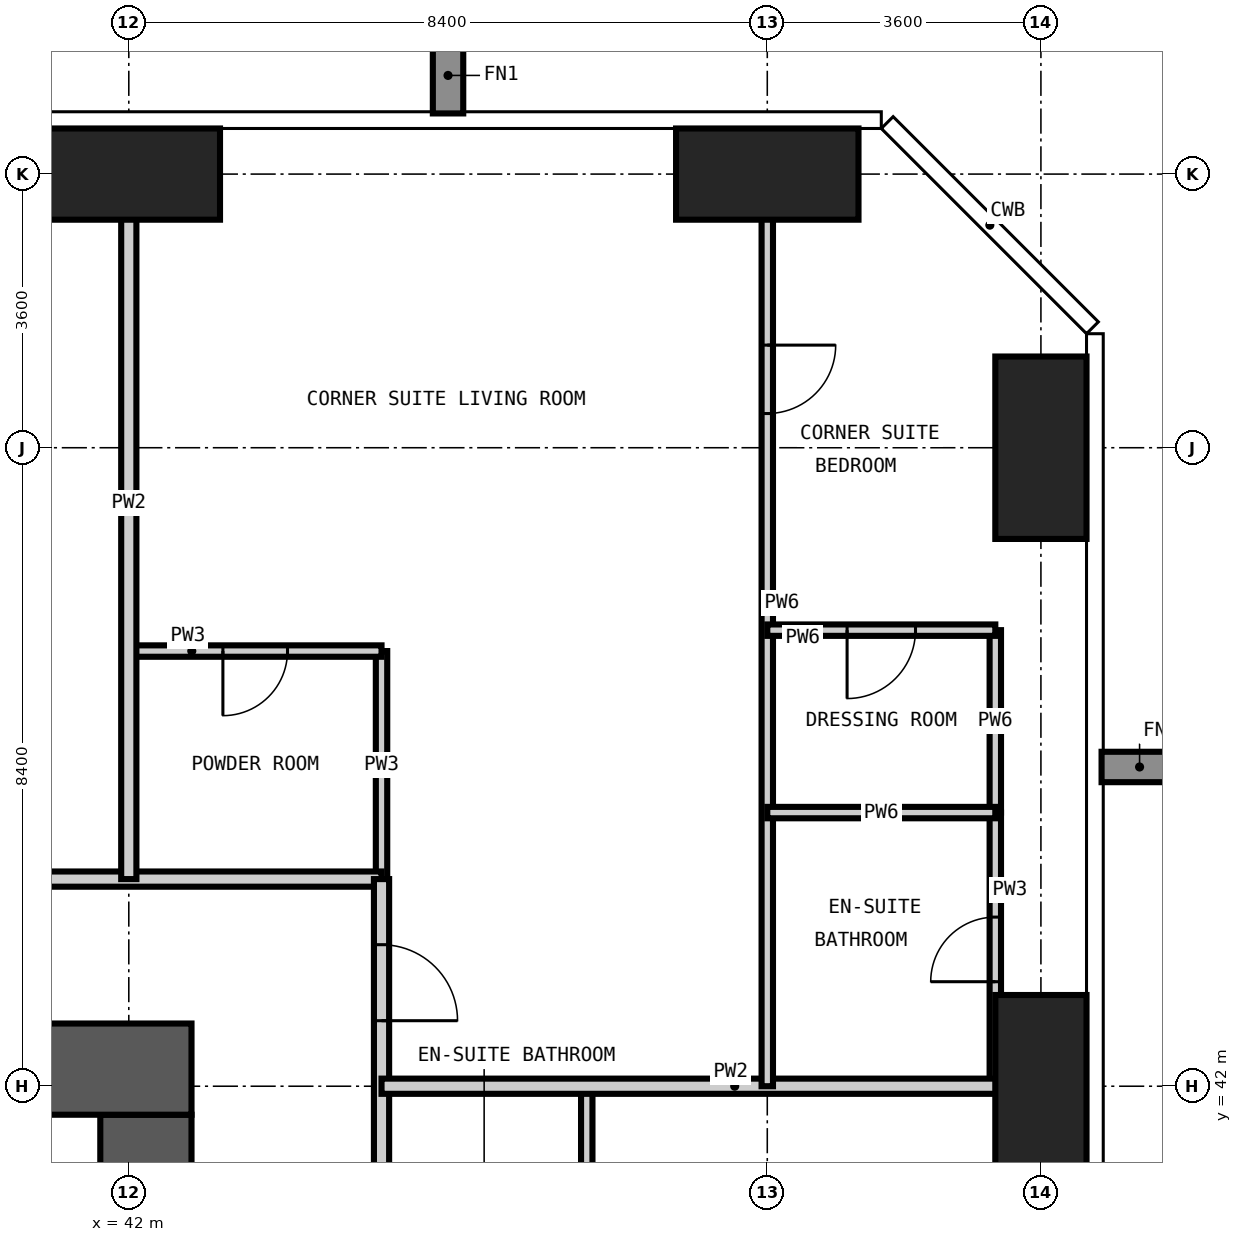
"""IFC4 building model, lengths in metres.
Left out: names, types, materials, properties, quantities, classifications, styles, units other than length and angle.
Written with IfcOpenShell. Run it as: python <this file> out.ifc"""

import sys

from ifc_helpers import new_model, si_unit, direction, frame, frame_2d, origin, origin_2d, place, context, subcontext, project, spatial, rectangle, extrude, element, fill, save


model = new_model("IFC4")
c1 = context("Model", 3, precision=1e-05, world=origin(), true_north=direction((0.0, 1.0)))
c2 = subcontext(c1, "Body", "Model", "MODEL_VIEW")
j1 = project(units=[si_unit("LENGTHUNIT", "METRE"), si_unit("PLANEANGLEUNIT", "RADIAN")], contexts=[c1])
p1 = place(None, origin())
s1 = spatial("IfcSite", under=j1, at=p1, CompositionType="ELEMENT")
p2 = place(p1, origin())
s2 = spatial("IfcBuilding", under=s1, at=p2, CompositionType="ELEMENT")
p3 = place(p2, frame((0.0, 0.0, 111.6)))
s3 = spatial("IfcBuildingStorey", under=s2, at=p3, CompositionType="ELEMENT", Elevation=111.6)
for number, where, z_axis, x_axis in (
    (1, (42.0, 54.0, -0.35), (0.0, 0.0, 1.0), (1.0, 0.0, 0.0)),
    (2, (50.4, 54.0, -0.35), (0.0, 0.0, 1.0), (1.0, 0.0, 0.0)),
):
    element("IfcColumn", number, at=place(p3, frame(where, z_axis=z_axis, x_axis=x_axis)), inside=s3, PredefinedType="COLUMN", context=c2, shape_type="SweptSolid", body=[
        extrude(rectangle(XDim=2.4, YDim=1.2, at=origin_2d()), origin(), (0.0, 0.0, 1.0), 3.6),
    ])
for number, where, z_axis, x_axis in (
    (3, (54.0, 42.0, -0.35), (0.0, 0.0, 1.0), (1.0, 0.0, 0.0)),
    (4, (54.0, 50.4, -0.35), (0.0, 0.0, 1.0), (1.0, 0.0, 0.0)),
):
    element("IfcColumn", number, at=place(p3, frame(where, z_axis=z_axis, x_axis=x_axis)), inside=s3, PredefinedType="COLUMN", context=c2, shape_type="SweptSolid", body=[
        extrude(rectangle(XDim=1.2, YDim=2.4, at=origin_2d()), origin(), (0.0, 0.0, 1.0), 3.6),
    ])
p4 = place(p3, frame((42.225, 17.175, -0.35), z_axis=(0.0, 0.0, 1.0), x_axis=(0.0, 1.0, 0.0)))
e5 = element("IfcWall", 5, at=p4, inside=s3, PredefinedType="SHEAR", context=c2, shape_type="SweptSolid", body=[
    extrude(rectangle(XDim=24.45, YDim=1.2, at=frame_2d((12.225, 0.0))), origin(), (0.0, 0.0, 1.0), 3.6),
])
p5 = place(p4, frame((0.425, 0.0, 0.35)))
e6 = element("IfcOpeningElement", 6, at=p5, cuts=e5, PredefinedType="OPENING", context=c2, shape_type="SweptSolid", body=[
    extrude(rectangle(XDim=1.2, YDim=2.2, at=frame_2d((0.6, 1.1))), frame((0.0, 0.61, 0.0), z_axis=(0.0, -1.0, 0.0), x_axis=(1.0, 0.0, 0.0)), (0.0, 0.0, 1.0), 1.22),
])
p6 = place(p4, frame((11.325, 0.0, 0.35)))
e7 = element("IfcOpeningElement", 7, at=p6, cuts=e5, PredefinedType="OPENING", context=c2, shape_type="SweptSolid", body=[
    extrude(rectangle(XDim=1.8, YDim=2.2, at=frame_2d((0.9, 1.1))), frame((0.0, 0.61, 0.0), z_axis=(0.0, -1.0, 0.0), x_axis=(1.0, 0.0, 0.0)), (0.0, 0.0, 1.0), 1.22),
])
p7 = place(p4, frame((20.125, 0.0, 0.35)))
e8 = element("IfcOpeningElement", 8, at=p7, cuts=e5, PredefinedType="OPENING", context=c2, shape_type="SweptSolid", body=[
    extrude(rectangle(XDim=1.0, YDim=2.1, at=frame_2d((0.5, 1.05))), frame((0.0, 0.61, 0.0), z_axis=(0.0, -1.0, 0.0), x_axis=(1.0, 0.0, 0.0)), (0.0, 0.0, 1.0), 1.22),
])
p8 = place(p3, frame((42.825, 42.225, -0.35), z_axis=(0.0, 0.0, 1.0), x_axis=(-1.0, 0.0, 0.0)))
e9 = element("IfcWall", 9, at=p8, inside=s3, PredefinedType="SHEAR", context=c2, shape_type="SweptSolid", body=[
    extrude(rectangle(XDim=26.85, YDim=1.2, at=frame_2d((13.425, 0.0))), origin(), (0.0, 0.0, 1.0), 3.6),
])
p9 = place(p8, frame((21.325, 0.0, 0.35)))
e10 = element("IfcOpeningElement", 10, at=p9, cuts=e9, PredefinedType="OPENING", context=c2, shape_type="SweptSolid", body=[
    extrude(rectangle(XDim=1.0, YDim=2.1, at=frame_2d((0.5, 1.05))), frame((0.0, 0.61, 0.0), z_axis=(0.0, -1.0, 0.0), x_axis=(1.0, 0.0, 0.0)), (0.0, 0.0, 1.0), 1.22),
])
p10 = place(p8, frame((10.725, 0.0, 0.35)))
e11 = element("IfcOpeningElement", 11, at=p10, cuts=e9, PredefinedType="OPENING", context=c2, shape_type="SweptSolid", body=[
    extrude(rectangle(XDim=1.2, YDim=2.2, at=frame_2d((0.6, 1.1))), frame((0.0, 0.61, 0.0), z_axis=(0.0, -1.0, 0.0), x_axis=(1.0, 0.0, 0.0)), (0.0, 0.0, 1.0), 1.22),
])
p11 = place(p3, frame((45.325, 44.725, 0.0), z_axis=(0.0, 0.0, 1.0), x_axis=(0.0, 1.0, 0.0)))
e12 = element("IfcWall", 12, at=p11, inside=s3, PredefinedType="PARTITIONING", context=c2, shape_type="SweptSolid", body=[
    extrude(rectangle(XDim=3.0, YDim=0.15, at=frame_2d((1.5, 0.0))), origin(), (0.0, 0.0, 1.0), 3.25),
])
p12 = place(p3, frame((48.025, 39.6, 0.0), z_axis=(0.0, 0.0, 1.0), x_axis=(0.0, 1.0, 0.0)))
e13 = element("IfcWall", 13, at=p12, inside=s3, PredefinedType="PARTITIONING", context=c2, shape_type="SweptSolid", body=[
    extrude(rectangle(XDim=2.4, YDim=0.15, at=frame_2d((1.2, 0.0))), origin(), (0.0, 0.0, 1.0), 3.25),
])
p13 = place(p3, frame((53.4, 42.0, 0.0), z_axis=(0.0, 0.0, 1.0), x_axis=(0.0, 1.0, 0.0)))
e14 = element("IfcWall", 14, at=p13, inside=s3, PredefinedType="PARTITIONING", context=c2, shape_type="SweptSolid", body=[
    extrude(rectangle(XDim=3.6, YDim=0.15, at=frame_2d((1.8, 0.0))), origin(), (0.0, 0.0, 1.0), 3.25),
])
p14 = place(p13, frame((1.375, 0.0, 0.0)))
e15 = element("IfcOpeningElement", 15, at=p14, cuts=e14, PredefinedType="OPENING", context=c2, shape_type="SweptSolid", body=[
    extrude(rectangle(XDim=0.85, YDim=2.1, at=frame_2d((0.425, 1.05))), frame((0.0, 0.085, 0.0), z_axis=(0.0, -1.0, 0.0), x_axis=(1.0, 0.0, 0.0)), (0.0, 0.0, 1.0), 0.17),
])
p15 = place(p3, frame((42.0, 47.725, 0.0), z_axis=(0.0, 0.0, 1.0), x_axis=(1.0, 0.0, 0.0)))
e16 = element("IfcWall", 16, at=p15, inside=s3, PredefinedType="PARTITIONING", context=c2, shape_type="SweptSolid", body=[
    extrude(rectangle(XDim=3.325, YDim=0.15, at=frame_2d((1.663, 0.0))), origin(), (0.0, 0.0, 1.0), 3.25),
])
p16 = place(p15, frame((1.238, 0.0, 0.0)))
e17 = element("IfcOpeningElement", 17, at=p16, cuts=e16, PredefinedType="OPENING", context=c2, shape_type="SweptSolid", body=[
    extrude(rectangle(XDim=0.85, YDim=2.1, at=frame_2d((0.425, 1.05))), frame((0.0, 0.085, 0.0), z_axis=(0.0, -1.0, 0.0), x_axis=(1.0, 0.0, 0.0)), (0.0, 0.0, 1.0), 0.17),
])
p17 = place(p3, frame((12.6, 44.725, 0.0), z_axis=(0.0, 0.0, 1.0), x_axis=(1.0, 0.0, 0.0)))
e18 = element("IfcWall", 18, at=p17, inside=s3, PredefinedType="PARTITIONING", context=c2, shape_type="SweptSolid", body=[
    extrude(rectangle(XDim=32.725, YDim=0.2, at=frame_2d((16.362, 0.0))), origin(), (0.0, 0.0, 1.0), 3.25),
])
p18 = place(p17, frame((9.1, 0.0, 0.0)))
e19 = element("IfcOpeningElement", 19, at=p18, cuts=e18, PredefinedType="OPENING", context=c2, shape_type="SweptSolid", body=[
    extrude(rectangle(XDim=1.0, YDim=2.2, at=frame_2d((0.5, 1.1))), frame((0.0, 0.11, 0.0), z_axis=(0.0, -1.0, 0.0), x_axis=(1.0, 0.0, 0.0)), (0.0, 0.0, 1.0), 0.22),
])
p19 = place(p17, frame((17.5, 0.0, 0.0)))
e20 = element("IfcOpeningElement", 20, at=p19, cuts=e18, PredefinedType="OPENING", context=c2, shape_type="SweptSolid", body=[
    extrude(rectangle(XDim=1.0, YDim=2.2, at=frame_2d((0.5, 1.1))), frame((0.0, 0.11, 0.0), z_axis=(0.0, -1.0, 0.0), x_axis=(1.0, 0.0, 0.0)), (0.0, 0.0, 1.0), 0.22),
])
p20 = place(p17, frame((25.9, 0.0, 0.0)))
e21 = element("IfcOpeningElement", 21, at=p20, cuts=e18, PredefinedType="OPENING", context=c2, shape_type="SweptSolid", body=[
    extrude(rectangle(XDim=1.0, YDim=2.2, at=frame_2d((0.5, 1.1))), frame((0.0, 0.11, 0.0), z_axis=(0.0, -1.0, 0.0), x_axis=(1.0, 0.0, 0.0)), (0.0, 0.0, 1.0), 0.22),
])
p21 = place(p3, frame((45.325, 44.725, 0.0), z_axis=(0.0, 0.0, 1.0), x_axis=(0.0, -1.0, 0.0)))
e22 = element("IfcWall", 22, at=p21, inside=s3, PredefinedType="PARTITIONING", context=c2, shape_type="SweptSolid", body=[
    extrude(rectangle(XDim=31.85, YDim=0.2, at=frame_2d((15.925, 0.0))), origin(), (0.0, 0.0, 1.0), 3.25),
])
p22 = place(p21, frame((24.425, 0.0, 0.0)))
e23 = element("IfcOpeningElement", 23, at=p22, cuts=e22, PredefinedType="OPENING", context=c2, shape_type="SweptSolid", body=[
    extrude(rectangle(XDim=1.0, YDim=2.2, at=frame_2d((0.5, 1.1))), frame((0.0, 0.11, 0.0), z_axis=(0.0, -1.0, 0.0), x_axis=(1.0, 0.0, 0.0)), (0.0, 0.0, 1.0), 0.22),
])
p23 = place(p21, frame((16.025, 0.0, 0.0)))
e24 = element("IfcOpeningElement", 24, at=p23, cuts=e22, PredefinedType="OPENING", context=c2, shape_type="SweptSolid", body=[
    extrude(rectangle(XDim=1.0, YDim=2.2, at=frame_2d((0.5, 1.1))), frame((0.0, 0.11, 0.0), z_axis=(0.0, -1.0, 0.0), x_axis=(1.0, 0.0, 0.0)), (0.0, 0.0, 1.0), 0.22),
])
p24 = place(p21, frame((7.625, 0.0, 0.0)))
e25 = element("IfcOpeningElement", 25, at=p24, cuts=e22, PredefinedType="OPENING", context=c2, shape_type="SweptSolid", body=[
    extrude(rectangle(XDim=1.0, YDim=2.2, at=frame_2d((0.5, 1.1))), frame((0.0, 0.11, 0.0), z_axis=(0.0, -1.0, 0.0), x_axis=(1.0, 0.0, 0.0)), (0.0, 0.0, 1.0), 0.22),
])
p25 = place(p21, frame((29.387, 0.0, 0.0)))
e26 = element("IfcOpeningElement", 26, at=p25, cuts=e22, PredefinedType="OPENING", context=c2, shape_type="SweptSolid", body=[
    extrude(rectangle(XDim=1.0, YDim=2.2, at=frame_2d((0.5, 1.1))), frame((0.0, 0.11, 0.0), z_axis=(0.0, -1.0, 0.0), x_axis=(1.0, 0.0, 0.0)), (0.0, 0.0, 1.0), 0.22),
])
p26 = place(p21, frame((0.863, 0.0, 0.0)))
e27 = element("IfcOpeningElement", 27, at=p26, cuts=e22, PredefinedType="OPENING", context=c2, shape_type="SweptSolid", body=[
    extrude(rectangle(XDim=1.0, YDim=2.2, at=frame_2d((0.5, 1.1))), frame((0.0, 0.11, 0.0), z_axis=(0.0, -1.0, 0.0), x_axis=(1.0, 0.0, 0.0)), (0.0, 0.0, 1.0), 0.22),
])
p27 = place(p3, frame((42.0, 44.725, 0.0), z_axis=(0.0, 0.0, 1.0), x_axis=(0.0, 1.0, 0.0)))
e28 = element("IfcWall", 28, at=p27, inside=s3, PredefinedType="PARTITIONING", context=c2, shape_type="SweptSolid", body=[
    extrude(rectangle(XDim=9.893, YDim=0.2, at=frame_2d((4.946, 0.0))), origin(), (0.0, 0.0, 1.0), 3.25),
])
p28 = place(p3, frame((45.325, 42.0, 0.0), z_axis=(0.0, 0.0, 1.0), x_axis=(1.0, 0.0, 0.0)))
e29 = element("IfcWall", 29, at=p28, inside=s3, PredefinedType="PARTITIONING", context=c2, shape_type="SweptSolid", body=[
    extrude(rectangle(XDim=9.293, YDim=0.2, at=frame_2d((4.646, 0.0))), origin(), (0.0, 0.0, 1.0), 3.25),
])
p29 = place(p3, frame((50.4, 42.0, 0.0), z_axis=(0.0, 0.0, 1.0), x_axis=(0.0, 1.0, 0.0)))
e30 = element("IfcWall", 30, at=p29, inside=s3, PredefinedType="PARTITIONING", context=c2, shape_type="SweptSolid", body=[
    extrude(rectangle(XDim=12.618, YDim=0.15, at=frame_2d((6.309, 0.0))), origin(), (0.0, 0.0, 1.0), 3.25),
])
p30 = place(p29, frame((8.85, 0.0, 0.0)))
e31 = element("IfcOpeningElement", 31, at=p30, cuts=e30, PredefinedType="OPENING", context=c2, shape_type="SweptSolid", body=[
    extrude(rectangle(XDim=0.9, YDim=2.1, at=frame_2d((0.45, 1.05))), frame((0.0, 0.085, 0.0), z_axis=(0.0, -1.0, 0.0), x_axis=(1.0, 0.0, 0.0)), (0.0, 0.0, 1.0), 0.17),
])
p31 = place(p3, frame((53.4, 45.6, 0.0), z_axis=(0.0, 0.0, 1.0), x_axis=(0.0, 1.0, 0.0)))
e32 = element("IfcWall", 32, at=p31, inside=s3, PredefinedType="PARTITIONING", context=c2, shape_type="SweptSolid", body=[
    extrude(rectangle(XDim=2.4, YDim=0.15, at=frame_2d((1.2, 0.0))), origin(), (0.0, 0.0, 1.0), 3.25),
])
p32 = place(p3, frame((50.4, 45.6, 0.0), z_axis=(0.0, 0.0, 1.0), x_axis=(1.0, 0.0, 0.0)))
e33 = element("IfcWall", 33, at=p32, inside=s3, PredefinedType="PARTITIONING", context=c2, shape_type="SweptSolid", body=[
    extrude(rectangle(XDim=3.0, YDim=0.15, at=frame_2d((1.5, 0.0))), origin(), (0.0, 0.0, 1.0), 3.25),
])
p33 = place(p3, frame((50.4, 48.0, 0.0), z_axis=(0.0, 0.0, 1.0), x_axis=(1.0, 0.0, 0.0)))
e34 = element("IfcWall", 34, at=p33, inside=s3, PredefinedType="PARTITIONING", context=c2, shape_type="SweptSolid", body=[
    extrude(rectangle(XDim=3.0, YDim=0.15, at=frame_2d((1.5, 0.0))), origin(), (0.0, 0.0, 1.0), 3.25),
])
p34 = place(p33, frame((1.05, 0.0, 0.0)))
e35 = element("IfcOpeningElement", 35, at=p34, cuts=e34, PredefinedType="OPENING", context=c2, shape_type="SweptSolid", body=[
    extrude(rectangle(XDim=0.9, YDim=2.1, at=frame_2d((0.45, 1.05))), frame((0.0, 0.085, 0.0), z_axis=(0.0, -1.0, 0.0), x_axis=(1.0, 0.0, 0.0)), (0.0, 0.0, 1.0), 0.17),
])
p35 = place(p26, origin())
e36 = element("IfcDoor", 36, at=p35, inside=s3, OperationType="SINGLE_SWING_RIGHT", PredefinedType="DOOR", context=c2, shape_type="SweptSolid", body=[
    extrude(rectangle(XDim=1.0, YDim=2.2, at=frame_2d((0.5, 1.1))), frame((0.0, 0.025, 0.0), z_axis=(0.0, -1.0, 0.0), x_axis=(1.0, 0.0, 0.0)), (0.0, 0.0, 1.0), 0.05),
])
fill(e27, e36)
p36 = place(p16, frame((0.85, 0.0, 0.0), z_axis=(0.0, 0.0, 1.0), x_axis=(-1.0, 0.0, 0.0)))
e37 = element("IfcDoor", 37, at=p36, inside=s3, OperationType="SINGLE_SWING_RIGHT", PredefinedType="DOOR", context=c2, shape_type="SweptSolid", body=[
    extrude(rectangle(XDim=0.85, YDim=2.1, at=frame_2d((0.425, 1.05))), frame((0.0, 0.025, 0.0), z_axis=(0.0, -1.0, 0.0), x_axis=(1.0, 0.0, 0.0)), (0.0, 0.0, 1.0), 0.05),
])
fill(e17, e37)
p37 = place(p30, frame((0.9, 0.0, 0.0), z_axis=(0.0, 0.0, 1.0), x_axis=(-1.0, 0.0, 0.0)))
e38 = element("IfcDoor", 38, at=p37, inside=s3, OperationType="SINGLE_SWING_LEFT", PredefinedType="DOOR", context=c2, shape_type="SweptSolid", body=[
    extrude(rectangle(XDim=0.9, YDim=2.1, at=frame_2d((0.45, 1.05))), frame((0.0, 0.025, 0.0), z_axis=(0.0, -1.0, 0.0), x_axis=(1.0, 0.0, 0.0)), (0.0, 0.0, 1.0), 0.05),
])
fill(e31, e38)
p38 = place(p14, origin())
e39 = element("IfcDoor", 39, at=p38, inside=s3, OperationType="SINGLE_SWING_LEFT", PredefinedType="DOOR", context=c2, shape_type="SweptSolid", body=[
    extrude(rectangle(XDim=0.85, YDim=2.1, at=frame_2d((0.425, 1.05))), frame((0.0, 0.025, 0.0), z_axis=(0.0, -1.0, 0.0), x_axis=(1.0, 0.0, 0.0)), (0.0, 0.0, 1.0), 0.05),
])
fill(e15, e39)
p39 = place(p34, frame((0.9, 0.0, 0.0), z_axis=(0.0, 0.0, 1.0), x_axis=(-1.0, 0.0, 0.0)))
e40 = element("IfcDoor", 40, at=p39, inside=s3, OperationType="SINGLE_SWING_RIGHT", PredefinedType="DOOR", context=c2, shape_type="SweptSolid", body=[
    extrude(rectangle(XDim=0.9, YDim=2.1, at=frame_2d((0.45, 1.05))), frame((0.0, 0.025, 0.0), z_axis=(0.0, -1.0, 0.0), x_axis=(1.0, 0.0, 0.0)), (0.0, 0.0, 1.0), 0.05),
])
fill(e35, e40)
save(model, sys.argv[1])
